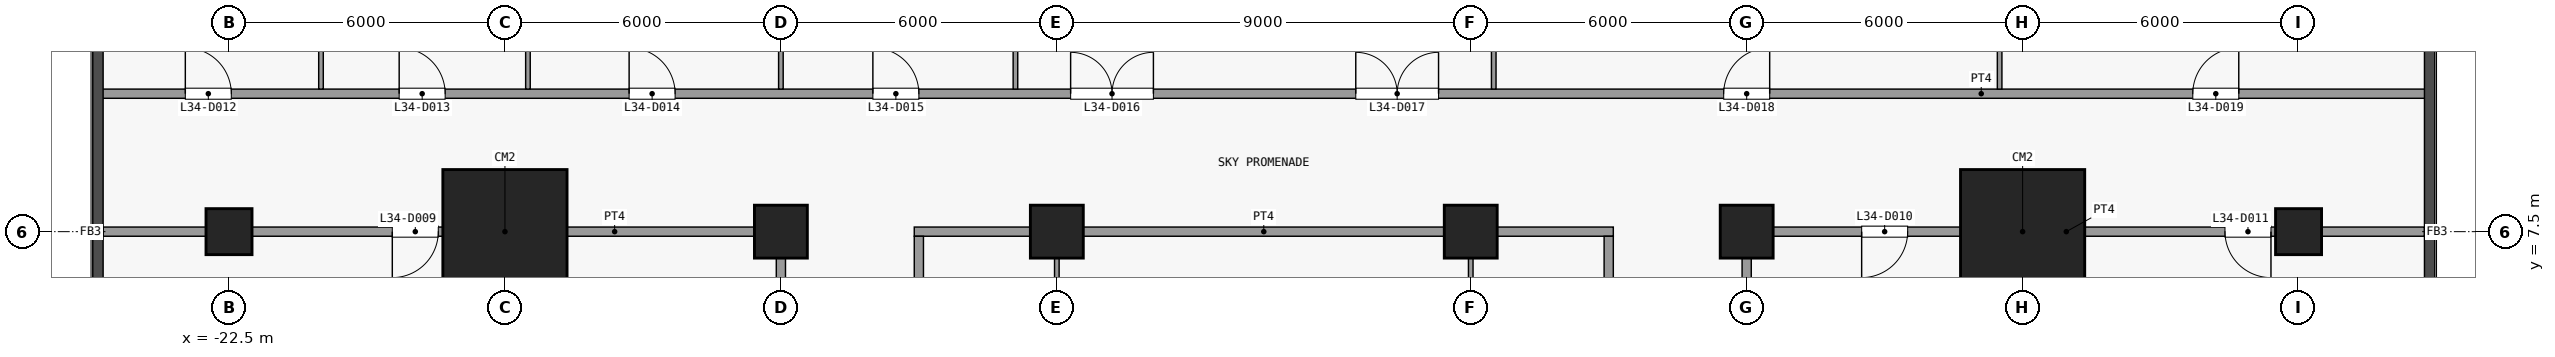
"""IFC4 building model, lengths in metres.
Left out: names, types, materials, properties, quantities, classifications, styles, units other than length and angle.
Written with IfcOpenShell. Run it as: python <this file> out.ifc"""

import sys

from ifc_helpers import new_model, si_unit, direction, frame, frame_2d, origin, origin_2d, place, context, subcontext, project, spatial, rectangle, extrude, element, fill, save


model = new_model("IFC4")
c1 = context("Model", 3, precision=1e-05, world=origin(), true_north=direction((0.0, 1.0)))
c2 = subcontext(c1, "Body", "Model", "MODEL_VIEW")
j1 = project(units=[si_unit("LENGTHUNIT", "METRE"), si_unit("PLANEANGLEUNIT", "RADIAN")], contexts=[c1])
p1 = place(None, origin())
s1 = spatial("IfcSite", under=j1, at=p1, CompositionType="ELEMENT")
p2 = place(p1, origin())
s2 = spatial("IfcBuilding", under=s1, at=p2, CompositionType="ELEMENT")
p3 = place(p2, frame((0.0, 0.0, 138.9)))
s3 = spatial("IfcBuildingStorey", under=s2, at=p3, CompositionType="ELEMENT", Elevation=138.9)
p4 = place(p3, frame((-22.5, 7.5, 0.0), z_axis=(0.0, 0.0, 1.0), x_axis=(1.0, 0.0, 0.0)))
e1 = element("IfcColumn", 1, at=p4, inside=s3, PredefinedType="COLUMN", context=c2, shape_type="SweptSolid", body=[
    extrude(rectangle(XDim=1.0, YDim=1.0, at=origin_2d()), origin(), (0.0, 0.0, 1.0), 5.0),
])
p5 = place(p3, frame((-16.5, 7.5, 0.0), z_axis=(0.0, 0.0, 1.0), x_axis=(1.0, 0.0, 0.0)))
e2 = element("IfcColumn", 2, at=p5, inside=s3, PredefinedType="COLUMN", context=c2, shape_type="SweptSolid", body=[
    extrude(rectangle(XDim=2.7, YDim=2.7, at=origin_2d()), origin(), (0.0, 0.0, 1.0), 5.0),
])
for number, where, z_axis, x_axis in (
    (3, (-10.5, 7.5, 0.0), (0.0, 0.0, 1.0), (1.0, 0.0, 0.0)),
    (4, (-4.5, 7.5, 0.0), (0.0, 0.0, 1.0), (1.0, 0.0, 0.0)),
    (5, (4.5, 7.5, 0.0), (0.0, 0.0, 1.0), (1.0, 0.0, 0.0)),
    (6, (10.5, 7.5, 0.0), (0.0, 0.0, 1.0), (1.0, 0.0, 0.0)),
):
    element("IfcColumn", number, at=place(p3, frame(where, z_axis=z_axis, x_axis=x_axis)), inside=s3, PredefinedType="COLUMN", context=c2, shape_type="SweptSolid", body=[
        extrude(rectangle(XDim=1.15, YDim=1.15, at=origin_2d()), origin(), (0.0, 0.0, 1.0), 5.0),
    ])
p6 = place(p3, frame((16.5, 7.5, 0.0), z_axis=(0.0, 0.0, 1.0), x_axis=(1.0, 0.0, 0.0)))
e7 = element("IfcColumn", 7, at=p6, inside=s3, PredefinedType="COLUMN", context=c2, shape_type="SweptSolid", body=[
    extrude(rectangle(XDim=2.7, YDim=2.7, at=origin_2d()), origin(), (0.0, 0.0, 1.0), 5.0),
])
p7 = place(p3, frame((22.5, 7.5, 0.0), z_axis=(0.0, 0.0, 1.0), x_axis=(1.0, 0.0, 0.0)))
e8 = element("IfcColumn", 8, at=p7, inside=s3, PredefinedType="COLUMN", context=c2, shape_type="SweptSolid", body=[
    extrude(rectangle(XDim=1.0, YDim=1.0, at=origin_2d()), origin(), (0.0, 0.0, 1.0), 5.0),
])
p8 = place(p3, frame((-25.238, 7.5, 0.0), z_axis=(0.0, 0.0, 1.0), x_axis=(1.0, 0.0, 0.0)))
e9 = element("IfcWall", 9, at=p8, inside=s3, PredefinedType="PARTITIONING", context=c2, shape_type="SweptSolid", body=[
    extrude(rectangle(XDim=14.838, YDim=0.2, at=frame_2d((7.419, 0.0))), origin(), (0.0, 0.0, 1.0), 4.55),
])
p9 = place(p8, frame((6.288, 0.0, 0.0)))
e10 = element("IfcOpeningElement", 10, at=p9, cuts=e9, PredefinedType="OPENING", context=c2, shape_type="SweptSolid", body=[
    extrude(rectangle(XDim=1.0, YDim=2.1, at=frame_2d((0.5, 1.05))), frame((0.0, 0.11, 0.0), z_axis=(0.0, -1.0, 0.0), x_axis=(1.0, 0.0, 0.0)), (0.0, 0.0, 1.0), 0.22),
])
p10 = place(p3, frame((-7.6, 7.5, 0.0), z_axis=(0.0, 0.0, 1.0), x_axis=(1.0, 0.0, 0.0)))
e11 = element("IfcWall", 11, at=p10, inside=s3, PredefinedType="PARTITIONING", context=c2, shape_type="SweptSolid", body=[
    extrude(rectangle(XDim=15.2, YDim=0.2, at=frame_2d((7.6, 0.0))), origin(), (0.0, 0.0, 1.0), 4.55),
])
p11 = place(p3, frame((10.4, 7.5, 0.0), z_axis=(0.0, 0.0, 1.0), x_axis=(1.0, 0.0, 0.0)))
e12 = element("IfcWall", 12, at=p11, inside=s3, PredefinedType="PARTITIONING", context=c2, shape_type="SweptSolid", body=[
    extrude(rectangle(XDim=14.838, YDim=0.2, at=frame_2d((7.419, 0.0))), origin(), (0.0, 0.0, 1.0), 4.55),
])
p12 = place(p11, frame((2.6, 0.0, 0.0)))
e13 = element("IfcOpeningElement", 13, at=p12, cuts=e12, PredefinedType="OPENING", context=c2, shape_type="SweptSolid", body=[
    extrude(rectangle(XDim=1.0, YDim=2.1, at=frame_2d((0.5, 1.05))), frame((0.0, 0.11, 0.0), z_axis=(0.0, -1.0, 0.0), x_axis=(1.0, 0.0, 0.0)), (0.0, 0.0, 1.0), 0.22),
])
p13 = place(p11, frame((10.5, 0.0, 0.0)))
e14 = element("IfcOpeningElement", 14, at=p13, cuts=e12, PredefinedType="OPENING", context=c2, shape_type="SweptSolid", body=[
    extrude(rectangle(XDim=1.0, YDim=2.1, at=frame_2d((0.5, 1.05))), frame((0.0, 0.11, 0.0), z_axis=(0.0, -1.0, 0.0), x_axis=(1.0, 0.0, 0.0)), (0.0, 0.0, 1.0), 0.22),
])
p14 = place(p3, frame((-25.35, 10.5, 0.0), z_axis=(0.0, 0.0, 1.0), x_axis=(1.0, 0.0, 0.0)))
e15 = element("IfcWall", 15, at=p14, inside=s3, PredefinedType="PARTITIONING", context=c2, shape_type="SweptSolid", body=[
    extrude(rectangle(XDim=50.7, YDim=0.2, at=frame_2d((25.35, 0.0))), origin(), (0.0, 0.0, 1.0), 4.55),
])
p15 = place(p14, frame((1.9, 0.0, 0.0)))
e16 = element("IfcOpeningElement", 16, at=p15, cuts=e15, PredefinedType="OPENING", context=c2, shape_type="SweptSolid", body=[
    extrude(rectangle(XDim=1.0, YDim=2.1, at=frame_2d((0.5, 1.05))), frame((0.0, 0.11, 0.0), z_axis=(0.0, -1.0, 0.0), x_axis=(1.0, 0.0, 0.0)), (0.0, 0.0, 1.0), 0.22),
])
p16 = place(p14, frame((6.55, 0.0, 0.0)))
e17 = element("IfcOpeningElement", 17, at=p16, cuts=e15, PredefinedType="OPENING", context=c2, shape_type="SweptSolid", body=[
    extrude(rectangle(XDim=1.0, YDim=2.1, at=frame_2d((0.5, 1.05))), frame((0.0, 0.11, 0.0), z_axis=(0.0, -1.0, 0.0), x_axis=(1.0, 0.0, 0.0)), (0.0, 0.0, 1.0), 0.22),
])
p17 = place(p14, frame((11.55, 0.0, 0.0)))
e18 = element("IfcOpeningElement", 18, at=p17, cuts=e15, PredefinedType="OPENING", context=c2, shape_type="SweptSolid", body=[
    extrude(rectangle(XDim=1.0, YDim=2.1, at=frame_2d((0.5, 1.05))), frame((0.0, 0.11, 0.0), z_axis=(0.0, -1.0, 0.0), x_axis=(1.0, 0.0, 0.0)), (0.0, 0.0, 1.0), 0.22),
])
p18 = place(p14, frame((16.85, 0.0, 0.0)))
e19 = element("IfcOpeningElement", 19, at=p18, cuts=e15, PredefinedType="OPENING", context=c2, shape_type="SweptSolid", body=[
    extrude(rectangle(XDim=1.0, YDim=2.1, at=frame_2d((0.5, 1.05))), frame((0.0, 0.11, 0.0), z_axis=(0.0, -1.0, 0.0), x_axis=(1.0, 0.0, 0.0)), (0.0, 0.0, 1.0), 0.22),
])
p19 = place(p14, frame((21.15, 0.0, 0.0)))
e20 = element("IfcOpeningElement", 20, at=p19, cuts=e15, PredefinedType="OPENING", context=c2, shape_type="SweptSolid", body=[
    extrude(rectangle(XDim=1.8, YDim=2.1, at=frame_2d((0.9, 1.05))), frame((0.0, 0.11, 0.0), z_axis=(0.0, -1.0, 0.0), x_axis=(1.0, 0.0, 0.0)), (0.0, 0.0, 1.0), 0.22),
])
p20 = place(p14, frame((27.35, 0.0, 0.0)))
e21 = element("IfcOpeningElement", 21, at=p20, cuts=e15, PredefinedType="OPENING", context=c2, shape_type="SweptSolid", body=[
    extrude(rectangle(XDim=1.8, YDim=2.1, at=frame_2d((0.9, 1.05))), frame((0.0, 0.11, 0.0), z_axis=(0.0, -1.0, 0.0), x_axis=(1.0, 0.0, 0.0)), (0.0, 0.0, 1.0), 0.22),
])
p21 = place(p14, frame((35.35, 0.0, 0.0)))
e22 = element("IfcOpeningElement", 22, at=p21, cuts=e15, PredefinedType="OPENING", context=c2, shape_type="SweptSolid", body=[
    extrude(rectangle(XDim=1.0, YDim=2.1, at=frame_2d((0.5, 1.05))), frame((0.0, 0.11, 0.0), z_axis=(0.0, -1.0, 0.0), x_axis=(1.0, 0.0, 0.0)), (0.0, 0.0, 1.0), 0.22),
])
p22 = place(p14, frame((45.55, 0.0, 0.0)))
e23 = element("IfcOpeningElement", 23, at=p22, cuts=e15, PredefinedType="OPENING", context=c2, shape_type="SweptSolid", body=[
    extrude(rectangle(XDim=1.0, YDim=2.1, at=frame_2d((0.5, 1.05))), frame((0.0, 0.11, 0.0), z_axis=(0.0, -1.0, 0.0), x_axis=(1.0, 0.0, 0.0)), (0.0, 0.0, 1.0), 0.22),
])
for number, where, z_axis, x_axis in (
    (24, (-20.5, 10.6, 0.0), (0.0, 0.0, 1.0), (0.0, 1.0, 0.0)),
    (25, (-16.0, 10.6, 0.0), (0.0, 0.0, 1.0), (0.0, 1.0, 0.0)),
):
    element("IfcWall", number, at=place(p3, frame(where, z_axis=z_axis, x_axis=x_axis)), inside=s3, PredefinedType="PARTITIONING", context=c2, shape_type="SweptSolid", body=[
        extrude(rectangle(XDim=5.85, YDim=0.1, at=frame_2d((2.925, 0.0))), origin(), (0.0, 0.0, 1.0), 4.55),
    ])
p23 = place(p3, frame((-10.5, -4.4, 0.0), z_axis=(0.0, 0.0, 1.0), x_axis=(0.0, 1.0, 0.0)))
e26 = element("IfcWall", 26, at=p23, inside=s3, PredefinedType="PARTITIONING", context=c2, shape_type="SweptSolid", body=[
    extrude(rectangle(XDim=11.8, YDim=0.2, at=frame_2d((5.9, 0.0))), origin(), (0.0, 0.0, 1.0), 4.55),
])
p24 = place(p3, frame((-10.5, 10.6, 0.0), z_axis=(0.0, 0.0, 1.0), x_axis=(0.0, 1.0, 0.0)))
e27 = element("IfcWall", 27, at=p24, inside=s3, PredefinedType="PARTITIONING", context=c2, shape_type="SweptSolid", body=[
    extrude(rectangle(XDim=11.637, YDim=0.1, at=frame_2d((5.819, 0.0))), origin(), (0.0, 0.0, 1.0), 4.55),
])
p25 = place(p3, frame((-7.5, -4.4, 0.0), z_axis=(0.0, 0.0, 1.0), x_axis=(0.0, 1.0, 0.0)))
e28 = element("IfcWall", 28, at=p25, inside=s3, PredefinedType="PARTITIONING", context=c2, shape_type="SweptSolid", body=[
    extrude(rectangle(XDim=11.8, YDim=0.2, at=frame_2d((5.9, 0.0))), origin(), (0.0, 0.0, 1.0), 4.55),
])
p26 = place(p25, frame((5.4, 0.0, 0.0)))
e29 = element("IfcOpeningElement", 29, at=p26, cuts=e28, PredefinedType="OPENING", context=c2, shape_type="SweptSolid", body=[
    extrude(rectangle(XDim=1.0, YDim=2.1, at=frame_2d((0.5, 1.05))), frame((0.0, 0.11, 0.0), z_axis=(0.0, -1.0, 0.0), x_axis=(1.0, 0.0, 0.0)), (0.0, 0.0, 1.0), 0.22),
])
p27 = place(p3, frame((-5.4, 10.6, 0.0), z_axis=(0.0, 0.0, 1.0), x_axis=(0.0, 1.0, 0.0)))
e30 = element("IfcWall", 30, at=p27, inside=s3, PredefinedType="PARTITIONING", context=c2, shape_type="SweptSolid", body=[
    extrude(rectangle(XDim=11.637, YDim=0.1, at=frame_2d((5.819, 0.0))), origin(), (0.0, 0.0, 1.0), 4.55),
])
for number, where, z_axis, x_axis in (
    (31, (-4.5, -4.4, 0.0), (0.0, 0.0, 1.0), (0.0, 1.0, 0.0)),
    (32, (4.5, -4.4, 0.0), (0.0, 0.0, 1.0), (0.0, 1.0, 0.0)),
):
    element("IfcWall", number, at=place(p3, frame(where, z_axis=z_axis, x_axis=x_axis)), inside=s3, PredefinedType="PARTITIONING", context=c2, shape_type="SweptSolid", body=[
        extrude(rectangle(XDim=11.8, YDim=0.1, at=frame_2d((5.9, 0.0))), origin(), (0.0, 0.0, 1.0), 4.55),
    ])
p28 = place(p3, frame((5.0, 10.6, 0.0), z_axis=(0.0, 0.0, 1.0), x_axis=(0.0, 1.0, 0.0)))
e33 = element("IfcWall", 33, at=p28, inside=s3, PredefinedType="PARTITIONING", context=c2, shape_type="SweptSolid", body=[
    extrude(rectangle(XDim=11.637, YDim=0.1, at=frame_2d((5.819, 0.0))), origin(), (0.0, 0.0, 1.0), 4.55),
])
p29 = place(p3, frame((7.5, -4.4, 0.0), z_axis=(0.0, 0.0, 1.0), x_axis=(0.0, 1.0, 0.0)))
e34 = element("IfcWall", 34, at=p29, inside=s3, PredefinedType="PARTITIONING", context=c2, shape_type="SweptSolid", body=[
    extrude(rectangle(XDim=11.8, YDim=0.2, at=frame_2d((5.9, 0.0))), origin(), (0.0, 0.0, 1.0), 4.55),
])
p30 = place(p29, frame((5.4, 0.0, 0.0)))
e35 = element("IfcOpeningElement", 35, at=p30, cuts=e34, PredefinedType="OPENING", context=c2, shape_type="SweptSolid", body=[
    extrude(rectangle(XDim=1.0, YDim=2.1, at=frame_2d((0.5, 1.05))), frame((0.0, 0.11, 0.0), z_axis=(0.0, -1.0, 0.0), x_axis=(1.0, 0.0, 0.0)), (0.0, 0.0, 1.0), 0.22),
])
p31 = place(p3, frame((10.5, -4.4, 0.0), z_axis=(0.0, 0.0, 1.0), x_axis=(0.0, 1.0, 0.0)))
e36 = element("IfcWall", 36, at=p31, inside=s3, PredefinedType="PARTITIONING", context=c2, shape_type="SweptSolid", body=[
    extrude(rectangle(XDim=11.8, YDim=0.2, at=frame_2d((5.9, 0.0))), origin(), (0.0, 0.0, 1.0), 4.55),
])
p32 = place(p3, frame((16.0, 10.6, 0.0), z_axis=(0.0, 0.0, 1.0), x_axis=(0.0, 1.0, 0.0)))
e37 = element("IfcWall", 37, at=p32, inside=s3, PredefinedType="PARTITIONING", context=c2, shape_type="SweptSolid", body=[
    extrude(rectangle(XDim=11.637, YDim=0.1, at=frame_2d((5.819, 0.0))), origin(), (0.0, 0.0, 1.0), 4.55),
])
p33 = place(p9, origin())
e38 = element("IfcDoor", 38, at=p33, inside=s3, OperationType="SINGLE_SWING_LEFT", PredefinedType="DOOR", context=c2, shape_type="SweptSolid", body=[
    extrude(rectangle(XDim=1.0, YDim=2.1, at=frame_2d((0.5, 1.05))), frame((0.0, 0.025, 0.0), z_axis=(0.0, -1.0, 0.0), x_axis=(1.0, 0.0, 0.0)), (0.0, 0.0, 1.0), 0.05),
])
fill(e10, e38)
p34 = place(p12, origin())
e39 = element("IfcDoor", 39, at=p34, inside=s3, OperationType="SINGLE_SWING_LEFT", PredefinedType="DOOR", context=c2, shape_type="SweptSolid", body=[
    extrude(rectangle(XDim=1.0, YDim=2.1, at=frame_2d((0.5, 1.05))), frame((0.0, 0.025, 0.0), z_axis=(0.0, -1.0, 0.0), x_axis=(1.0, 0.0, 0.0)), (0.0, 0.0, 1.0), 0.05),
])
fill(e13, e39)
p35 = place(p13, origin())
e40 = element("IfcDoor", 40, at=p35, inside=s3, OperationType="SINGLE_SWING_RIGHT", PredefinedType="DOOR", context=c2, shape_type="SweptSolid", body=[
    extrude(rectangle(XDim=1.0, YDim=2.1, at=frame_2d((0.5, 1.05))), frame((0.0, 0.025, 0.0), z_axis=(0.0, -1.0, 0.0), x_axis=(1.0, 0.0, 0.0)), (0.0, 0.0, 1.0), 0.05),
])
fill(e14, e40)
p36 = place(p15, origin())
e41 = element("IfcDoor", 41, at=p36, inside=s3, OperationType="SINGLE_SWING_RIGHT", PredefinedType="DOOR", context=c2, shape_type="SweptSolid", body=[
    extrude(rectangle(XDim=1.0, YDim=2.1, at=frame_2d((0.5, 1.05))), frame((0.0, 0.025, 0.0), z_axis=(0.0, -1.0, 0.0), x_axis=(1.0, 0.0, 0.0)), (0.0, 0.0, 1.0), 0.05),
])
fill(e16, e41)
p37 = place(p16, origin())
e42 = element("IfcDoor", 42, at=p37, inside=s3, OperationType="SINGLE_SWING_RIGHT", PredefinedType="DOOR", context=c2, shape_type="SweptSolid", body=[
    extrude(rectangle(XDim=1.0, YDim=2.1, at=frame_2d((0.5, 1.05))), frame((0.0, 0.025, 0.0), z_axis=(0.0, -1.0, 0.0), x_axis=(1.0, 0.0, 0.0)), (0.0, 0.0, 1.0), 0.05),
])
fill(e17, e42)
p38 = place(p17, origin())
e43 = element("IfcDoor", 43, at=p38, inside=s3, OperationType="SINGLE_SWING_RIGHT", PredefinedType="DOOR", context=c2, shape_type="SweptSolid", body=[
    extrude(rectangle(XDim=1.0, YDim=2.1, at=frame_2d((0.5, 1.05))), frame((0.0, 0.025, 0.0), z_axis=(0.0, -1.0, 0.0), x_axis=(1.0, 0.0, 0.0)), (0.0, 0.0, 1.0), 0.05),
])
fill(e18, e43)
p39 = place(p18, origin())
e44 = element("IfcDoor", 44, at=p39, inside=s3, OperationType="SINGLE_SWING_RIGHT", PredefinedType="DOOR", context=c2, shape_type="SweptSolid", body=[
    extrude(rectangle(XDim=1.0, YDim=2.1, at=frame_2d((0.5, 1.05))), frame((0.0, 0.025, 0.0), z_axis=(0.0, -1.0, 0.0), x_axis=(1.0, 0.0, 0.0)), (0.0, 0.0, 1.0), 0.05),
])
fill(e19, e44)
p40 = place(p19, origin())
e45 = element("IfcDoor", 45, at=p40, inside=s3, OperationType="DOUBLE_DOOR_SINGLE_SWING", PredefinedType="DOOR", context=c2, shape_type="SweptSolid", body=[
    extrude(rectangle(XDim=1.8, YDim=2.1, at=frame_2d((0.9, 1.05))), frame((0.0, 0.025, 0.0), z_axis=(0.0, -1.0, 0.0), x_axis=(1.0, 0.0, 0.0)), (0.0, 0.0, 1.0), 0.05),
])
fill(e20, e45)
p41 = place(p20, origin())
e46 = element("IfcDoor", 46, at=p41, inside=s3, OperationType="DOUBLE_DOOR_SINGLE_SWING", PredefinedType="DOOR", context=c2, shape_type="SweptSolid", body=[
    extrude(rectangle(XDim=1.8, YDim=2.1, at=frame_2d((0.9, 1.05))), frame((0.0, 0.025, 0.0), z_axis=(0.0, -1.0, 0.0), x_axis=(1.0, 0.0, 0.0)), (0.0, 0.0, 1.0), 0.05),
])
fill(e21, e46)
p42 = place(p21, origin())
e47 = element("IfcDoor", 47, at=p42, inside=s3, OperationType="SINGLE_SWING_LEFT", PredefinedType="DOOR", context=c2, shape_type="SweptSolid", body=[
    extrude(rectangle(XDim=1.0, YDim=2.1, at=frame_2d((0.5, 1.05))), frame((0.0, 0.025, 0.0), z_axis=(0.0, -1.0, 0.0), x_axis=(1.0, 0.0, 0.0)), (0.0, 0.0, 1.0), 0.05),
])
fill(e22, e47)
p43 = place(p22, origin())
e48 = element("IfcDoor", 48, at=p43, inside=s3, OperationType="SINGLE_SWING_LEFT", PredefinedType="DOOR", context=c2, shape_type="SweptSolid", body=[
    extrude(rectangle(XDim=1.0, YDim=2.1, at=frame_2d((0.5, 1.05))), frame((0.0, 0.025, 0.0), z_axis=(0.0, -1.0, 0.0), x_axis=(1.0, 0.0, 0.0)), (0.0, 0.0, 1.0), 0.05),
])
fill(e23, e48)
save(model, sys.argv[1])
